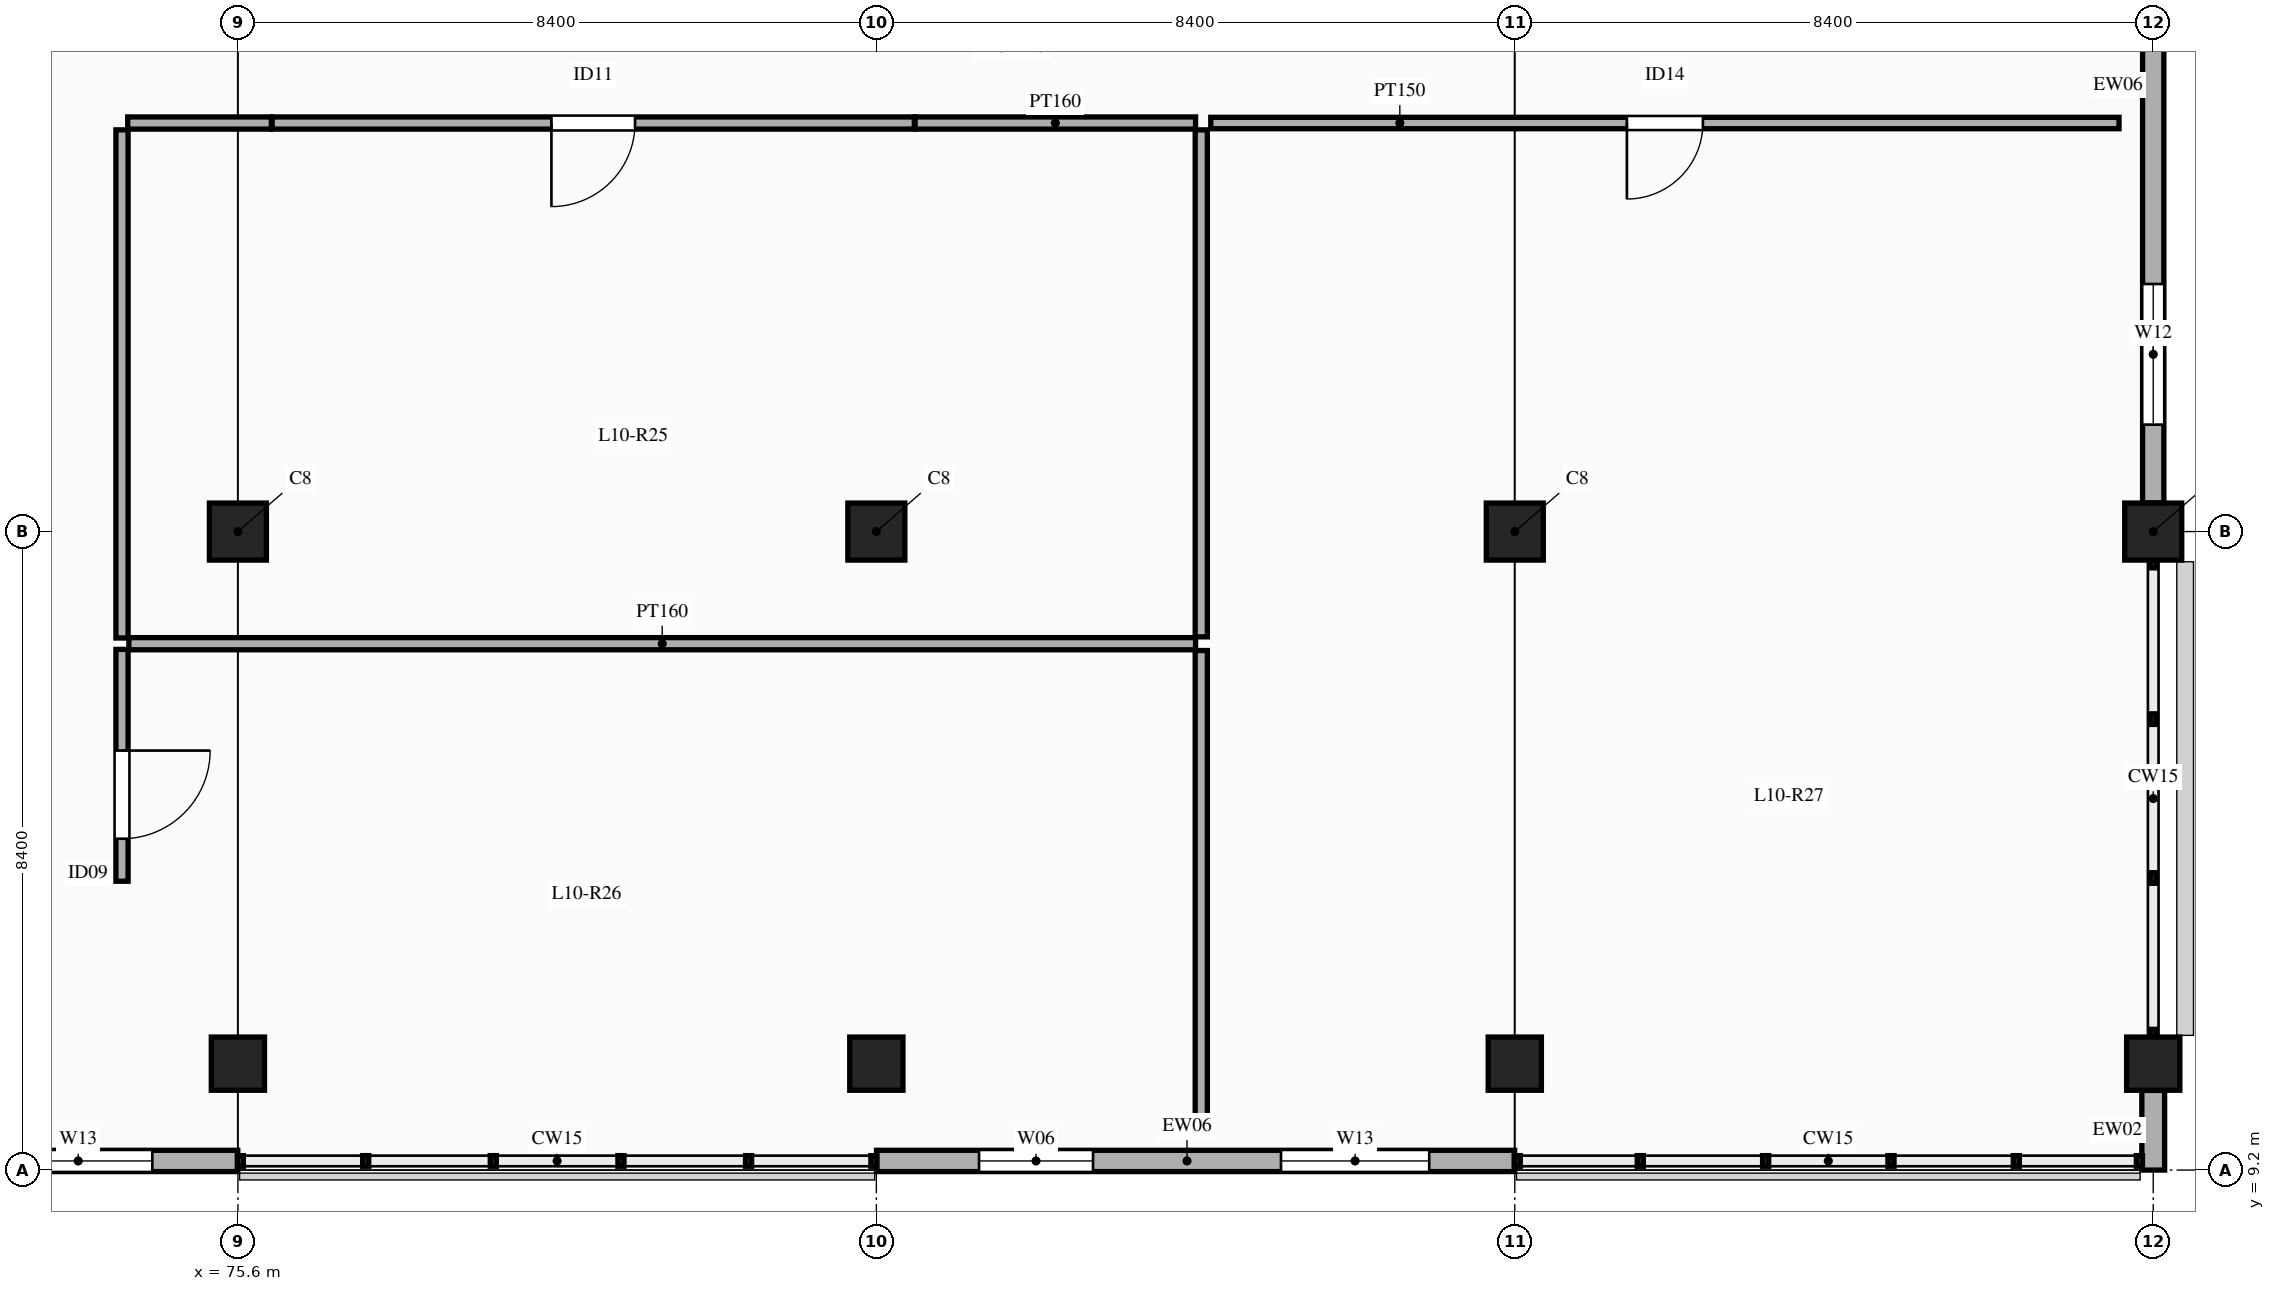
"""IFC4 building model, lengths in metres.
Left out: names, types, materials, properties, quantities, classifications, styles, units other than length and angle.
Written with IfcOpenShell. Run it as: python <this file> out.ifc"""

import sys

from ifc_helpers import new_model, si_unit, direction, frame, frame_2d, origin, origin_2d, place, context, subcontext, project, spatial, rectangle, extrude, element, fill, save


model = new_model("IFC4")
c1 = context("Model", 3, precision=1e-05, world=origin(), true_north=direction((0.0, 1.0)))
c2 = subcontext(c1, "Body", "Model", "MODEL_VIEW")
j1 = project(units=[si_unit("LENGTHUNIT", "METRE"), si_unit("PLANEANGLEUNIT", "RADIAN")], contexts=[c1])
p1 = place(None, origin())
s1 = spatial("IfcSite", under=j1, at=p1, CompositionType="ELEMENT")
p2 = place(p1, origin())
s2 = spatial("IfcBuilding", under=s1, at=p2, CompositionType="ELEMENT")
p3 = place(p2, frame((0.0, 0.0, 46.5)))
s3 = spatial("IfcBuildingStorey", under=s2, at=p3, CompositionType="ELEMENT", Elevation=46.5)
p4 = place(p3, frame((75.6, 10.6, 0.0), z_axis=(0.0, 0.0, 1.0), x_axis=(1.0, 0.0, 0.0)))
e1 = element("IfcColumn", 1, at=p4, inside=s3, PredefinedType="COLUMN", context=c2, shape_type="SweptSolid", body=[
    extrude(rectangle(XDim=0.7, YDim=0.7, at=origin_2d()), origin(), (0.0, 0.0, 1.0), 4.5),
])
p5 = place(p3, frame((75.6, 17.6, 0.0), z_axis=(0.0, 0.0, 1.0), x_axis=(1.0, 0.0, 0.0)))
e2 = element("IfcColumn", 2, at=p5, inside=s3, PredefinedType="COLUMN", context=c2, shape_type="SweptSolid", body=[
    extrude(rectangle(XDim=0.75, YDim=0.75, at=origin_2d()), origin(), (0.0, 0.0, 1.0), 4.5),
])
p6 = place(p3, frame((84.0, 10.6, 0.0), z_axis=(0.0, 0.0, 1.0), x_axis=(1.0, 0.0, 0.0)))
e3 = element("IfcColumn", 3, at=p6, inside=s3, PredefinedType="COLUMN", context=c2, shape_type="SweptSolid", body=[
    extrude(rectangle(XDim=0.7, YDim=0.7, at=origin_2d()), origin(), (0.0, 0.0, 1.0), 4.5),
])
p7 = place(p3, frame((84.0, 17.6, 0.0), z_axis=(0.0, 0.0, 1.0), x_axis=(1.0, 0.0, 0.0)))
e4 = element("IfcColumn", 4, at=p7, inside=s3, PredefinedType="COLUMN", context=c2, shape_type="SweptSolid", body=[
    extrude(rectangle(XDim=0.75, YDim=0.75, at=origin_2d()), origin(), (0.0, 0.0, 1.0), 4.5),
])
p8 = place(p3, frame((92.4, 10.6, 0.0), z_axis=(0.0, 0.0, 1.0), x_axis=(1.0, 0.0, 0.0)))
e5 = element("IfcColumn", 5, at=p8, inside=s3, PredefinedType="COLUMN", context=c2, shape_type="SweptSolid", body=[
    extrude(rectangle(XDim=0.7, YDim=0.7, at=origin_2d()), origin(), (0.0, 0.0, 1.0), 4.5),
])
p9 = place(p3, frame((92.4, 17.6, 0.0), z_axis=(0.0, 0.0, 1.0), x_axis=(1.0, 0.0, 0.0)))
e6 = element("IfcColumn", 6, at=p9, inside=s3, PredefinedType="COLUMN", context=c2, shape_type="SweptSolid", body=[
    extrude(rectangle(XDim=0.75, YDim=0.75, at=origin_2d()), origin(), (0.0, 0.0, 1.0), 4.5),
])
p10 = place(p3, frame((100.8, 10.6, 0.0), z_axis=(0.0, 0.0, 1.0), x_axis=(1.0, 0.0, 0.0)))
e7 = element("IfcColumn", 7, at=p10, inside=s3, PredefinedType="COLUMN", context=c2, shape_type="SweptSolid", body=[
    extrude(rectangle(XDim=0.7, YDim=0.7, at=origin_2d()), origin(), (0.0, 0.0, 1.0), 4.5),
])
p11 = place(p3, frame((100.8, 17.6, 0.0), z_axis=(0.0, 0.0, 1.0), x_axis=(1.0, 0.0, 0.0)))
e8 = element("IfcColumn", 8, at=p11, inside=s3, PredefinedType="COLUMN", context=c2, shape_type="SweptSolid", body=[
    extrude(rectangle(XDim=0.75, YDim=0.75, at=origin_2d()), origin(), (0.0, 0.0, 1.0), 4.5),
])
p12 = place(p3, frame((100.8, 9.2, 0.0), z_axis=(0.0, 0.0, 1.0), x_axis=(0.0, 1.0, 0.0)))
e9 = element("IfcWall", 9, at=p12, inside=s3, PredefinedType="SOLIDWALL", context=c2, shape_type="SweptSolid", body=[
    extrude(rectangle(XDim=1.048, YDim=0.3, at=frame_2d((0.524, 0.0))), origin(), (0.0, 0.0, 1.0), 3.55),
])
p13 = place(p3, frame((67.202, 9.32, 0.0), z_axis=(0.0, 0.0, 1.0), x_axis=(1.0, 0.0, 0.0)))
e10 = element("IfcWall", 10, at=p13, inside=s3, PredefinedType="ELEMENTEDWALL", context=c2, shape_type="SweptSolid", body=[
    extrude(rectangle(XDim=8.396, YDim=0.28, at=frame_2d((4.198, 0.0))), origin(), (0.0, 0.0, 1.0), 3.55),
])
p14 = place(p13, frame((1.349, 0.0, 0.9)))
e11 = element("IfcOpeningElement", 11, at=p14, cuts=e10, PredefinedType="OPENING", context=c2, shape_type="SweptSolid", body=[
    extrude(rectangle(XDim=1.5, YDim=2.0, at=frame_2d((0.75, 1.0))), frame((0.0, 0.15, 0.0), z_axis=(0.0, -1.0, 0.0), x_axis=(1.0, 0.0, 0.0)), (0.0, 0.0, 1.0), 0.3),
])
p15 = place(p13, frame((5.322, 0.0, 0.9)))
e12 = element("IfcOpeningElement", 12, at=p15, cuts=e10, PredefinedType="OPENING", context=c2, shape_type="SweptSolid", body=[
    extrude(rectangle(XDim=1.95, YDim=2.0, at=frame_2d((0.975, 1.0))), frame((0.0, 0.15, 0.0), z_axis=(0.0, -1.0, 0.0), x_axis=(1.0, 0.0, 0.0)), (0.0, 0.0, 1.0), 0.3),
])
p16 = place(p3, frame((84.002, 9.32, 0.0), z_axis=(0.0, 0.0, 1.0), x_axis=(1.0, 0.0, 0.0)))
e13 = element("IfcWall", 13, at=p16, inside=s3, PredefinedType="ELEMENTEDWALL", context=c2, shape_type="SweptSolid", body=[
    extrude(rectangle(XDim=8.396, YDim=0.28, at=frame_2d((4.198, 0.0))), origin(), (0.0, 0.0, 1.0), 3.55),
])
p17 = place(p16, frame((1.349, 0.0, 0.9)))
e14 = element("IfcOpeningElement", 14, at=p17, cuts=e13, PredefinedType="OPENING", context=c2, shape_type="SweptSolid", body=[
    extrude(rectangle(XDim=1.5, YDim=2.0, at=frame_2d((0.75, 1.0))), frame((0.0, 0.15, 0.0), z_axis=(0.0, -1.0, 0.0), x_axis=(1.0, 0.0, 0.0)), (0.0, 0.0, 1.0), 0.3),
])
p18 = place(p16, frame((5.322, 0.0, 0.9)))
e15 = element("IfcOpeningElement", 15, at=p18, cuts=e13, PredefinedType="OPENING", context=c2, shape_type="SweptSolid", body=[
    extrude(rectangle(XDim=1.95, YDim=2.0, at=frame_2d((0.975, 1.0))), frame((0.0, 0.15, 0.0), z_axis=(0.0, -1.0, 0.0), x_axis=(1.0, 0.0, 0.0)), (0.0, 0.0, 1.0), 0.3),
])
p19 = place(p3, frame((100.8, 17.977, 0.0), z_axis=(0.0, 0.0, 1.0), x_axis=(0.0, 1.0, 0.0)))
e16 = element("IfcWall", 16, at=p19, inside=s3, PredefinedType="ELEMENTEDWALL", context=c2, shape_type="SweptSolid", body=[
    extrude(rectangle(XDim=7.821, YDim=0.28, at=frame_2d((3.911, 0.0))), origin(), (0.0, 0.0, 1.0), 3.55),
])
p20 = place(p19, frame((1.03, 0.0, 0.9)))
e17 = element("IfcOpeningElement", 17, at=p20, cuts=e16, PredefinedType="OPENING", context=c2, shape_type="SweptSolid", body=[
    extrude(rectangle(XDim=1.85, YDim=2.05, at=frame_2d((0.925, 1.025))), frame((0.0, 0.15, 0.0), z_axis=(0.0, -1.0, 0.0), x_axis=(1.0, 0.0, 0.0)), (0.0, 0.0, 1.0), 0.3),
])
p21 = place(p3, frame((76.05, 22.975, 0.0), z_axis=(0.0, 0.0, 1.0), x_axis=(1.0, 0.0, 0.0)))
e18 = element("IfcWall", 18, at=p21, inside=s3, PredefinedType="PARTITIONING", context=c2, shape_type="SweptSolid", body=[
    extrude(rectangle(XDim=8.45, YDim=0.16, at=frame_2d((4.225, 0.0))), origin(), (0.0, 0.0, 1.0), 3.45),
])
p22 = place(p21, frame((3.675, 0.0, 0.0)))
e19 = element("IfcOpeningElement", 19, at=p22, cuts=e18, PredefinedType="OPENING", context=c2, shape_type="SweptSolid", body=[
    extrude(rectangle(XDim=1.1, YDim=2.2, at=frame_2d((0.55, 1.1))), frame((0.0, 0.09, 0.0), z_axis=(0.0, -1.0, 0.0), x_axis=(1.0, 0.0, 0.0)), (0.0, 0.0, 1.0), 0.18),
])
p23 = place(p3, frame((84.51, 22.975, 0.0), z_axis=(0.0, 0.0, 1.0), x_axis=(1.0, 0.0, 0.0)))
e20 = element("IfcWall", 20, at=p23, inside=s3, PredefinedType="PARTITIONING", context=c2, shape_type="SweptSolid", body=[
    extrude(rectangle(XDim=3.69, YDim=0.16, at=frame_2d((1.845, 0.0))), origin(), (0.0, 0.0, 1.0), 3.45),
])
p24 = place(p3, frame((74.15, 22.975, 0.0), z_axis=(0.0, 0.0, 1.0), x_axis=(1.0, 0.0, 0.0)))
e21 = element("IfcWall", 21, at=p24, inside=s3, PredefinedType="PARTITIONING", context=c2, shape_type="SweptSolid", body=[
    extrude(rectangle(XDim=1.89, YDim=0.16, at=frame_2d((0.945, 0.0))), origin(), (0.0, 0.0, 1.0), 3.45),
])
p25 = place(p3, frame((88.4, 22.975, 0.0), z_axis=(0.0, 0.0, 1.0), x_axis=(1.0, 0.0, 0.0)))
e22 = element("IfcWall", 22, at=p25, inside=s3, PredefinedType="PARTITIONING", context=c2, shape_type="SweptSolid", body=[
    extrude(rectangle(XDim=11.95, YDim=0.15, at=frame_2d((5.975, 0.0))), origin(), (0.0, 0.0, 1.0), 3.45),
])
p26 = place(p25, frame((5.475, 0.0, 0.0)))
e23 = element("IfcOpeningElement", 23, at=p26, cuts=e22, PredefinedType="OPENING", context=c2, shape_type="SweptSolid", body=[
    extrude(rectangle(XDim=1.0, YDim=2.15, at=frame_2d((0.5, 1.075))), frame((0.0, 0.085, 0.0), z_axis=(0.0, -1.0, 0.0), x_axis=(1.0, 0.0, 0.0)), (0.0, 0.0, 1.0), 0.17),
])
p27 = place(p3, frame((74.075, 16.2, 0.0), z_axis=(0.0, 0.0, 1.0), x_axis=(0.0, 1.0, 0.0)))
e24 = element("IfcWall", 24, at=p27, inside=s3, PredefinedType="PARTITIONING", context=c2, shape_type="SweptSolid", body=[
    extrude(rectangle(XDim=6.685, YDim=0.16, at=frame_2d((3.343, 0.0))), origin(), (0.0, 0.0, 1.0), 3.45),
])
p28 = place(p3, frame((74.075, 13.0, 0.0), z_axis=(0.0, 0.0, 1.0), x_axis=(0.0, 1.0, 0.0)))
e25 = element("IfcWall", 25, at=p28, inside=s3, PredefinedType="PARTITIONING", context=c2, shape_type="SweptSolid", body=[
    extrude(rectangle(XDim=3.05, YDim=0.16, at=frame_2d((1.525, 0.0))), origin(), (0.0, 0.0, 1.0), 3.45),
])
p29 = place(p28, frame((0.559, 0.0, 0.0)))
e26 = element("IfcOpeningElement", 26, at=p29, cuts=e25, PredefinedType="OPENING", context=c2, shape_type="SweptSolid", body=[
    extrude(rectangle(XDim=1.16, YDim=2.2, at=frame_2d((0.58, 1.1))), frame((0.0, 0.09, 0.0), z_axis=(0.0, -1.0, 0.0), x_axis=(1.0, 0.0, 0.0)), (0.0, 0.0, 1.0), 0.18),
])
p30 = place(p3, frame((74.165, 16.125, 0.0), z_axis=(0.0, 0.0, 1.0), x_axis=(1.0, 0.0, 0.0)))
e27 = element("IfcWall", 27, at=p30, inside=s3, PredefinedType="PARTITIONING", context=c2, shape_type="SweptSolid", body=[
    extrude(rectangle(XDim=14.035, YDim=0.16, at=frame_2d((7.018, 0.0))), origin(), (0.0, 0.0, 1.0), 3.45),
])
p31 = place(p3, frame((88.275, 16.215, 0.0), z_axis=(0.0, 0.0, 1.0), x_axis=(0.0, 1.0, 0.0)))
e28 = element("IfcWall", 28, at=p31, inside=s3, PredefinedType="PARTITIONING", context=c2, shape_type="SweptSolid", body=[
    extrude(rectangle(XDim=6.67, YDim=0.16, at=frame_2d((3.335, 0.0))), origin(), (0.0, 0.0, 1.0), 3.45),
])
p32 = place(p3, frame((88.275, 9.65, 0.0), z_axis=(0.0, 0.0, 1.0), x_axis=(0.0, 1.0, 0.0)))
e29 = element("IfcWall", 29, at=p32, inside=s3, PredefinedType="PARTITIONING", context=c2, shape_type="SweptSolid", body=[
    extrude(rectangle(XDim=6.385, YDim=0.16, at=frame_2d((3.192, 0.0))), origin(), (0.0, 0.0, 1.0), 3.45),
])
p33 = place(p15, origin())
e30 = element("IfcWindow", 30, at=p33, inside=s3, PartitioningType="TRIPLE_PANEL_VERTICAL", PredefinedType="WINDOW", context=c2, shape_type="SweptSolid", body=[
    extrude(rectangle(XDim=1.95, YDim=2.0, at=frame_2d((0.975, 1.0))), frame((0.0, 0.03, 0.0), z_axis=(0.0, -1.0, 0.0), x_axis=(1.0, 0.0, 0.0)), (0.0, 0.0, 1.0), 0.06),
])
fill(e12, e30)
p34 = place(p17, origin())
e31 = element("IfcWindow", 31, at=p34, inside=s3, PartitioningType="DOUBLE_PANEL_VERTICAL", PredefinedType="WINDOW", context=c2, shape_type="SweptSolid", body=[
    extrude(rectangle(XDim=1.5, YDim=2.0, at=frame_2d((0.75, 1.0))), frame((0.0, 0.03, 0.0), z_axis=(0.0, -1.0, 0.0), x_axis=(1.0, 0.0, 0.0)), (0.0, 0.0, 1.0), 0.06),
])
fill(e14, e31)
p35 = place(p18, origin())
e32 = element("IfcWindow", 32, at=p35, inside=s3, PartitioningType="TRIPLE_PANEL_VERTICAL", PredefinedType="WINDOW", context=c2, shape_type="SweptSolid", body=[
    extrude(rectangle(XDim=1.95, YDim=2.0, at=frame_2d((0.975, 1.0))), frame((0.0, 0.03, 0.0), z_axis=(0.0, -1.0, 0.0), x_axis=(1.0, 0.0, 0.0)), (0.0, 0.0, 1.0), 0.06),
])
fill(e15, e32)
p36 = place(p20, origin())
e33 = element("IfcWindow", 33, at=p36, inside=s3, PartitioningType="DOUBLE_PANEL_HORIZONTAL", PredefinedType="WINDOW", context=c2, shape_type="SweptSolid", body=[
    extrude(rectangle(XDim=1.85, YDim=2.05, at=frame_2d((0.925, 1.025))), frame((0.0, 0.03, 0.0), z_axis=(0.0, -1.0, 0.0), x_axis=(1.0, 0.0, 0.0)), (0.0, 0.0, 1.0), 0.06),
])
fill(e17, e33)
p37 = place(p22, frame((1.1, 0.0, 0.0), z_axis=(0.0, 0.0, 1.0), x_axis=(-1.0, 0.0, 0.0)))
e34 = element("IfcDoor", 34, at=p37, inside=s3, OperationType="SINGLE_SWING_RIGHT", PredefinedType="DOOR", context=c2, shape_type="SweptSolid", body=[
    extrude(rectangle(XDim=1.1, YDim=2.2, at=frame_2d((0.55, 1.1))), frame((0.0, 0.025, 0.0), z_axis=(0.0, -1.0, 0.0), x_axis=(1.0, 0.0, 0.0)), (0.0, 0.0, 1.0), 0.05),
])
fill(e19, e34)
p38 = place(p29, frame((1.16, 0.0, 0.0), z_axis=(0.0, 0.0, 1.0), x_axis=(-1.0, 0.0, 0.0)))
e35 = element("IfcDoor", 35, at=p38, inside=s3, OperationType="SINGLE_SWING_LEFT", PredefinedType="DOOR", context=c2, shape_type="SweptSolid", body=[
    extrude(rectangle(XDim=1.16, YDim=2.2, at=frame_2d((0.58, 1.1))), frame((0.0, 0.025, 0.0), z_axis=(0.0, -1.0, 0.0), x_axis=(1.0, 0.0, 0.0)), (0.0, 0.0, 1.0), 0.05),
])
fill(e26, e35)
p39 = place(p26, frame((1.0, 0.0, 0.0), z_axis=(0.0, 0.0, 1.0), x_axis=(-1.0, 0.0, 0.0)))
e36 = element("IfcDoor", 36, at=p39, inside=s3, OperationType="SINGLE_SWING_RIGHT", PredefinedType="DOOR", context=c2, shape_type="SweptSolid", body=[
    extrude(rectangle(XDim=1.0, YDim=2.15, at=frame_2d((0.5, 1.075))), frame((0.0, 0.025, 0.0), z_axis=(0.0, -1.0, 0.0), x_axis=(1.0, 0.0, 0.0)), (0.0, 0.0, 1.0), 0.05),
])
fill(e23, e36)
save(model, sys.argv[1])
